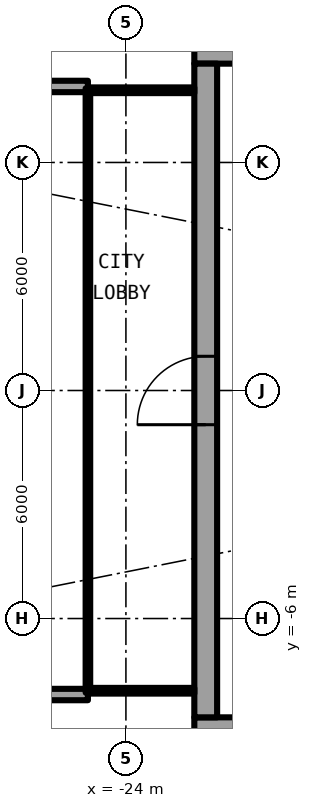
"""IFC4 building model, lengths in metres.
Left out: names, types, materials, properties, quantities, classifications, styles, units other than length and angle.
Written with IfcOpenShell. Run it as: python <this file> out.ifc"""

import sys

from ifc_helpers import new_model, si_unit, direction, frame, frame_2d, origin, place, context, subcontext, project, spatial, rectangle, extrude, element, fill, save


model = new_model("IFC4")
c1 = context("Model", 3, precision=1e-05, world=origin(), true_north=direction((0.0, 1.0)))
c2 = subcontext(c1, "Body", "Model", "MODEL_VIEW")
j1 = project(units=[si_unit("LENGTHUNIT", "METRE"), si_unit("PLANEANGLEUNIT", "RADIAN")], contexts=[c1])
p1 = place(None, origin())
s1 = spatial("IfcSite", under=j1, at=p1, CompositionType="ELEMENT")
p2 = place(p1, origin())
s2 = spatial("IfcBuilding", under=s1, at=p2, CompositionType="ELEMENT")
p3 = place(p2, frame((0.0, 0.0, 123.85)))
s3 = spatial("IfcBuildingStorey", under=s2, at=p3, CompositionType="ELEMENT", Elevation=123.85)
for number, where, z_axis, x_axis in (
    (1, (-25.0, 8.0, 0.0), (0.0, 0.0, 1.0), (-1.0, 0.0, 0.0)),
    (2, (-25.0, -8.0, 0.0), (0.0, 0.0, 1.0), (-1.0, 0.0, 0.0)),
):
    element("IfcWall", number, at=place(p3, frame(where, z_axis=z_axis, x_axis=x_axis)), inside=s3, PredefinedType="SOLIDWALL", context=c2, shape_type="SweptSolid", body=[
        extrude(rectangle(XDim=2.667, YDim=0.3, at=frame_2d((1.333, 0.0))), origin(), (0.0, 0.0, 1.0), 2.7),
    ])
p4 = place(p3, frame((-22.2, -8.9, 0.0), z_axis=(0.0, 0.0, 1.0), x_axis=(1.0, 0.0, 0.0)))
e3 = element("IfcWall", 3, at=p4, inside=s3, PredefinedType="SHEAR", context=c2, shape_type="SweptSolid", body=[
    extrude(rectangle(XDim=13.8, YDim=0.6, at=frame_2d((6.9, 0.0))), origin(), (0.0, 0.0, 1.0), 3.05),
])
p5 = place(p4, frame((1.125, 0.0, 0.0)))
e4 = element("IfcOpeningElement", 4, at=p5, cuts=e3, PredefinedType="OPENING", context=c2, shape_type="SweptSolid", body=[
    extrude(rectangle(XDim=1.2, YDim=2.3, at=frame_2d((0.6, 1.15))), frame((0.0, 0.31, 0.0), z_axis=(0.0, -1.0, 0.0), x_axis=(1.0, 0.0, 0.0)), (0.0, 0.0, 1.0), 0.62),
])
p6 = place(p3, frame((-8.4, 8.9, 0.0), z_axis=(0.0, 0.0, 1.0), x_axis=(-1.0, 0.0, 0.0)))
e5 = element("IfcWall", 5, at=p6, inside=s3, PredefinedType="SHEAR", context=c2, shape_type="SweptSolid", body=[
    extrude(rectangle(XDim=13.8, YDim=0.6, at=frame_2d((6.9, 0.0))), origin(), (0.0, 0.0, 1.0), 3.05),
])
p7 = place(p6, frame((11.475, 0.0, 0.0)))
e6 = element("IfcOpeningElement", 6, at=p7, cuts=e5, PredefinedType="OPENING", context=c2, shape_type="SweptSolid", body=[
    extrude(rectangle(XDim=1.2, YDim=2.3, at=frame_2d((0.6, 1.15))), frame((0.0, 0.31, 0.0), z_axis=(0.0, -1.0, 0.0), x_axis=(1.0, 0.0, 0.0)), (0.0, 0.0, 1.0), 0.62),
])
p8 = place(p3, frame((-21.9, -8.6, 0.0), z_axis=(0.0, 0.0, 1.0), x_axis=(0.0, 1.0, 0.0)))
e7 = element("IfcWall", 7, at=p8, inside=s3, PredefinedType="SHEAR", context=c2, shape_type="SweptSolid", body=[
    extrude(rectangle(XDim=17.2, YDim=0.6, at=frame_2d((8.6, 0.0))), origin(), (0.0, 0.0, 1.0), 3.05),
])
p9 = place(p8, frame((7.7, 0.0, 0.0)))
e8 = element("IfcOpeningElement", 8, at=p9, cuts=e7, PredefinedType="OPENING", context=c2, shape_type="SweptSolid", body=[
    extrude(rectangle(XDim=1.8, YDim=2.3, at=frame_2d((0.9, 1.15))), frame((0.0, 0.31, 0.0), z_axis=(0.0, -1.0, 0.0), x_axis=(1.0, 0.0, 0.0)), (0.0, 0.0, 1.0), 0.62),
])
for number, where, z_axis, x_axis in (
    (9, (-22.2, 7.9, 0.0), (0.0, 0.0, 1.0), (-1.0, 0.0, 0.0)),
    (10, (-22.2, -7.9, 0.0), (0.0, 0.0, 1.0), (-1.0, 0.0, 0.0)),
):
    element("IfcWall", number, at=place(p3, frame(where, z_axis=z_axis, x_axis=x_axis)), inside=s3, PredefinedType="PARTITIONING", context=c2, shape_type="SweptSolid", body=[
        extrude(rectangle(XDim=2.74, YDim=0.15, at=frame_2d((1.37, 0.0))), origin(), (0.0, 0.0, 1.0), 2.7),
    ])
p10 = place(p3, frame((-25.0, 7.95, 0.0), z_axis=(0.0, 0.0, 1.0), x_axis=(0.0, -1.0, 0.0)))
e11 = element("IfcWall", 11, at=p10, inside=s3, PredefinedType="PARTITIONING", context=c2, shape_type="SweptSolid", body=[
    extrude(rectangle(XDim=15.9, YDim=0.12, at=frame_2d((7.95, 0.0))), origin(), (0.0, 0.0, 1.0), 2.7),
])
p11 = place(p10, frame((0.95, 0.0, 0.1)))
e12 = element("IfcOpeningElement", 12, at=p11, cuts=e11, PredefinedType="OPENING", context=c2, shape_type="SweptSolid", body=[
    extrude(rectangle(XDim=14.0, YDim=2.35, at=frame_2d((7.0, 1.175))), frame((0.0, 0.07, 0.0), z_axis=(0.0, -1.0, 0.0), x_axis=(1.0, 0.0, 0.0)), (0.0, 0.0, 1.0), 0.14),
])
p12 = place(p9, origin())
e13 = element("IfcDoor", 13, at=p12, inside=s3, OperationType="SINGLE_SWING_LEFT", PredefinedType="DOOR", context=c2, shape_type="SweptSolid", body=[
    extrude(rectangle(XDim=1.8, YDim=2.3, at=frame_2d((0.9, 1.15))), frame((0.0, 0.025, 0.0), z_axis=(0.0, -1.0, 0.0), x_axis=(1.0, 0.0, 0.0)), (0.0, 0.0, 1.0), 0.05),
])
fill(e8, e13)
p13 = place(p11, origin())
e14 = element("IfcWindow", 14, at=p13, inside=s3, PartitioningType="SINGLE_PANEL", PredefinedType="WINDOW", context=c2, shape_type="SweptSolid", body=[
    extrude(rectangle(XDim=14.0, YDim=2.35, at=frame_2d((7.0, 1.175))), frame((0.0, 0.03, 0.0), z_axis=(0.0, -1.0, 0.0), x_axis=(1.0, 0.0, 0.0)), (0.0, 0.0, 1.0), 0.06),
])
fill(e12, e14)
save(model, sys.argv[1])
